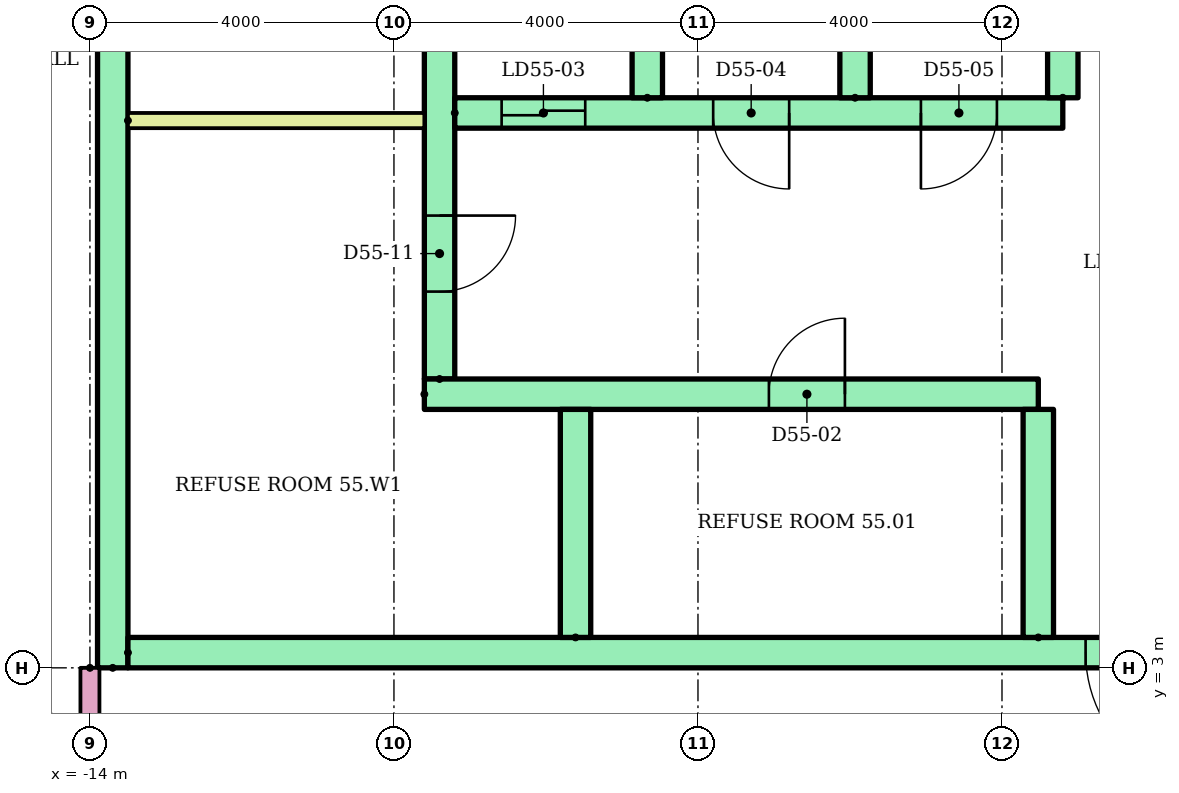
"""IFC4 building model, lengths in metres.
Left out: names, types, materials, properties, quantities, classifications, styles, units other than length and angle.
Written with IfcOpenShell. Run it as: python <this file> out.ifc"""

import sys

from ifc_helpers import new_model, si_unit, direction, frame, frame_2d, origin, place, context, subcontext, project, spatial, rectangle, extrude, element, fill, save


model = new_model("IFC4")
c1 = context("Model", 3, precision=1e-05, world=origin(), true_north=direction((0.0, 1.0)))
c2 = subcontext(c1, "Body", "Model", "MODEL_VIEW")
j1 = project(units=[si_unit("LENGTHUNIT", "METRE"), si_unit("PLANEANGLEUNIT", "RADIAN")], contexts=[c1])
p1 = place(None, origin())
s1 = spatial("IfcSite", under=j1, at=p1, CompositionType="ELEMENT")
p2 = place(p1, origin())
s2 = spatial("IfcBuilding", under=s1, at=p2, CompositionType="ELEMENT")
p3 = place(p2, frame((0.0, 0.0, 214.0)))
s3 = spatial("IfcBuildingStorey", under=s2, at=p3, CompositionType="ELEMENT", Elevation=214.0)
p4 = place(p3, frame((-13.7, 3.0, 0.0), z_axis=(0.0, 0.0, 1.0), x_axis=(0.0, 1.0, 0.0)))
e1 = element("IfcWall", 1, at=p4, inside=s3, PredefinedType="SHEAR", context=c2, shape_type="SweptSolid", body=[
    extrude(rectangle(XDim=17.0, YDim=0.4, at=frame_2d((8.5, 0.0))), origin(), (0.0, 0.0, 1.0), 2.92),
])
p5 = place(p3, frame((-9.4, 6.8, 0.0), z_axis=(0.0, 0.0, 1.0), x_axis=(0.0, 1.0, 0.0)))
e2 = element("IfcWall", 2, at=p5, inside=s3, PredefinedType="SHEAR", context=c2, shape_type="SweptSolid", body=[
    extrude(rectangle(XDim=12.7, YDim=0.4, at=frame_2d((6.35, 0.0))), origin(), (0.0, 0.0, 1.0), 2.92),
])
p6 = place(p5, frame((1.15, 0.0, 0.0)))
e3 = element("IfcOpeningElement", 3, at=p6, cuts=e2, PredefinedType="OPENING", context=c2, shape_type="SweptSolid", body=[
    extrude(rectangle(XDim=1.0, YDim=2.1, at=frame_2d((0.5, 1.05))), frame((0.0, 0.21, 0.0), z_axis=(0.0, -1.0, 0.0), x_axis=(1.0, 0.0, 0.0)), (0.0, 0.0, 1.0), 0.42),
])
p7 = place(p5, frame((7.925, 0.0, 0.0)))
e4 = element("IfcOpeningElement", 4, at=p7, cuts=e2, PredefinedType="OPENING", context=c2, shape_type="SweptSolid", body=[
    extrude(rectangle(XDim=1.0, YDim=2.1, at=frame_2d((0.5, 1.05))), frame((0.0, 0.21, 0.0), z_axis=(0.0, -1.0, 0.0), x_axis=(1.0, 0.0, 0.0)), (0.0, 0.0, 1.0), 0.42),
])
p8 = place(p3, frame((-13.5, 3.2, 0.0)))
e5 = element("IfcWall", 5, at=p8, inside=s3, PredefinedType="SHEAR", context=c2, shape_type="SweptSolid", body=[
    extrude(rectangle(XDim=27.0, YDim=0.4, at=frame_2d((13.5, 0.0))), origin(), (0.0, 0.0, 1.0), 2.92),
])
p9 = place(p8, frame((22.083, 0.0, 0.0)))
e6 = element("IfcOpeningElement", 6, at=p9, cuts=e5, PredefinedType="OPENING", context=c2, shape_type="SweptSolid", body=[
    extrude(rectangle(XDim=1.1, YDim=2.1, at=frame_2d((0.55, 1.05))), frame((0.0, 0.21, 0.0), z_axis=(0.0, -1.0, 0.0), x_axis=(1.0, 0.0, 0.0)), (0.0, 0.0, 1.0), 0.42),
])
p10 = place(p8, frame((25.128, 0.0, 0.0)))
e7 = element("IfcOpeningElement", 7, at=p10, cuts=e5, PredefinedType="OPENING", context=c2, shape_type="SweptSolid", body=[
    extrude(rectangle(XDim=1.1, YDim=2.1, at=frame_2d((0.55, 1.05))), frame((0.0, 0.21, 0.0), z_axis=(0.0, -1.0, 0.0), x_axis=(1.0, 0.0, 0.0)), (0.0, 0.0, 1.0), 0.42),
])
p11 = place(p8, frame((12.6, 0.0, 0.0)))
e8 = element("IfcOpeningElement", 8, at=p11, cuts=e5, PredefinedType="OPENING", context=c2, shape_type="SweptSolid", body=[
    extrude(rectangle(XDim=1.8, YDim=2.1, at=frame_2d((0.9, 1.05))), frame((0.0, 0.21, 0.0), z_axis=(0.0, -1.0, 0.0), x_axis=(1.0, 0.0, 0.0)), (0.0, 0.0, 1.0), 0.42),
])
p12 = place(p3, frame((-9.6, 6.6, 0.0)))
e9 = element("IfcWall", 9, at=p12, inside=s3, PredefinedType="SHEAR", context=c2, shape_type="SweptSolid", body=[
    extrude(rectangle(XDim=8.078, YDim=0.4, at=frame_2d((4.039, 0.0))), origin(), (0.0, 0.0, 1.0), 2.92),
])
p13 = place(p12, frame((4.533, 0.0, 0.0)))
e10 = element("IfcOpeningElement", 10, at=p13, cuts=e9, PredefinedType="OPENING", context=c2, shape_type="SweptSolid", body=[
    extrude(rectangle(XDim=1.0, YDim=2.1, at=frame_2d((0.5, 1.05))), frame((0.0, 0.21, 0.0), z_axis=(0.0, -1.0, 0.0), x_axis=(1.0, 0.0, 0.0)), (0.0, 0.0, 1.0), 0.42),
])
for number, where, z_axis, x_axis in (
    (11, (-7.611, 3.4, 0.0), (0.0, 0.0, 1.0), (0.0, 1.0, 0.0)),
    (12, (-1.522, 3.4, 0.0), (0.0, 0.0, 1.0), (0.0, 1.0, 0.0)),
):
    element("IfcWall", number, at=place(p3, frame(where, z_axis=z_axis, x_axis=x_axis)), inside=s3, PredefinedType="SHEAR", context=c2, shape_type="SweptSolid", body=[
        extrude(rectangle(XDim=3.0, YDim=0.4, at=frame_2d((1.5, 0.0))), origin(), (0.0, 0.0, 1.0), 2.92),
    ])
p14 = place(p3, frame((-9.2, 10.3, 0.0)))
e13 = element("IfcWall", 13, at=p14, inside=s3, PredefinedType="SHEAR", context=c2, shape_type="SweptSolid", body=[
    extrude(rectangle(XDim=8.0, YDim=0.4, at=frame_2d((4.0, 0.0))), origin(), (0.0, 0.0, 1.0), 2.92),
])
p15 = place(p14, frame((0.617, 0.0, 0.0)))
e14 = element("IfcOpeningElement", 14, at=p15, cuts=e13, PredefinedType="OPENING", context=c2, shape_type="SweptSolid", body=[
    extrude(rectangle(XDim=1.1, YDim=2.1, at=frame_2d((0.55, 1.05))), frame((0.0, 0.21, 0.0), z_axis=(0.0, -1.0, 0.0), x_axis=(1.0, 0.0, 0.0)), (0.0, 0.0, 1.0), 0.42),
])
p16 = place(p14, frame((3.4, 0.0, 0.0)))
e15 = element("IfcOpeningElement", 15, at=p16, cuts=e13, PredefinedType="OPENING", context=c2, shape_type="SweptSolid", body=[
    extrude(rectangle(XDim=1.0, YDim=2.1, at=frame_2d((0.5, 1.05))), frame((0.0, 0.21, 0.0), z_axis=(0.0, -1.0, 0.0), x_axis=(1.0, 0.0, 0.0)), (0.0, 0.0, 1.0), 0.42),
])
p17 = place(p14, frame((6.133, 0.0, 0.0)))
e16 = element("IfcOpeningElement", 16, at=p17, cuts=e13, PredefinedType="OPENING", context=c2, shape_type="SweptSolid", body=[
    extrude(rectangle(XDim=1.0, YDim=2.1, at=frame_2d((0.5, 1.05))), frame((0.0, 0.21, 0.0), z_axis=(0.0, -1.0, 0.0), x_axis=(1.0, 0.0, 0.0)), (0.0, 0.0, 1.0), 0.42),
])
for number, where, z_axis, x_axis in (
    (17, (-6.667, 10.5, 0.0), (0.0, 0.0, 1.0), (0.0, 1.0, 0.0)),
    (18, (-3.933, 10.5, 0.0), (0.0, 0.0, 1.0), (0.0, 1.0, 0.0)),
    (19, (-1.2, 10.5, 0.0), (0.0, 0.0, 1.0), (0.0, 1.0, 0.0)),
):
    element("IfcWall", number, at=place(p3, frame(where, z_axis=z_axis, x_axis=x_axis)), inside=s3, PredefinedType="SHEAR", context=c2, shape_type="SweptSolid", body=[
        extrude(rectangle(XDim=3.0, YDim=0.4, at=frame_2d((1.5, 0.0))), origin(), (0.0, 0.0, 1.0), 2.92),
    ])
p18 = place(p3, frame((-13.5, 10.2, 0.0)))
e20 = element("IfcWall", 20, at=p18, inside=s3, PredefinedType="PARTITIONING", context=c2, shape_type="SweptSolid", body=[
    extrude(rectangle(XDim=3.9, YDim=0.2, at=frame_2d((1.95, 0.0))), origin(), (0.0, 0.0, 1.0), 2.92),
])
p19 = place(p3, frame((-14.0, 3.0, 0.0), z_axis=(0.0, 0.0, 1.0), x_axis=(0.0, -1.0, 0.0)))
e21 = element("IfcWall", 21, at=p19, inside=s3, PredefinedType="PARTITIONING", context=c2, shape_type="SweptSolid", body=[
    extrude(rectangle(XDim=1.6, YDim=0.25, at=frame_2d((0.8, 0.0))), origin(), (0.0, 0.0, 1.0), 2.4),
])
p20 = place(p11, frame((1.8, 0.0, 0.0), z_axis=(0.0, 0.0, 1.0), x_axis=(-1.0, 0.0, 0.0)))
e22 = element("IfcDoor", 22, at=p20, inside=s3, OperationType="DOUBLE_DOOR_SINGLE_SWING", PredefinedType="DOOR", context=c2, shape_type="SweptSolid", body=[
    extrude(rectangle(XDim=1.8, YDim=2.1, at=frame_2d((0.9, 1.05))), frame((0.0, 0.025, 0.0), z_axis=(0.0, -1.0, 0.0), x_axis=(1.0, 0.0, 0.0)), (0.0, 0.0, 1.0), 0.05),
])
fill(e8, e22)
p21 = place(p13, origin())
e23 = element("IfcDoor", 23, at=p21, inside=s3, OperationType="SINGLE_SWING_RIGHT", PredefinedType="DOOR", context=c2, shape_type="SweptSolid", body=[
    extrude(rectangle(XDim=1.0, YDim=2.1, at=frame_2d((0.5, 1.05))), frame((0.0, 0.025, 0.0), z_axis=(0.0, -1.0, 0.0), x_axis=(1.0, 0.0, 0.0)), (0.0, 0.0, 1.0), 0.05),
])
fill(e10, e23)
p22 = place(p15, origin())
e24 = element("IfcDoor", 24, at=p22, inside=s3, OperationType="SLIDING_TO_LEFT", PredefinedType="DOOR", context=c2, shape_type="SweptSolid", body=[
    extrude(rectangle(XDim=1.1, YDim=2.1, at=frame_2d((0.55, 1.05))), frame((0.0, 0.025, 0.0), z_axis=(0.0, -1.0, 0.0), x_axis=(1.0, 0.0, 0.0)), (0.0, 0.0, 1.0), 0.05),
])
fill(e14, e24)
p23 = place(p16, frame((1.0, 0.0, 0.0), z_axis=(0.0, 0.0, 1.0), x_axis=(-1.0, 0.0, 0.0)))
e25 = element("IfcDoor", 25, at=p23, inside=s3, OperationType="SINGLE_SWING_RIGHT", PredefinedType="DOOR", context=c2, shape_type="SweptSolid", body=[
    extrude(rectangle(XDim=1.0, YDim=2.1, at=frame_2d((0.5, 1.05))), frame((0.0, 0.025, 0.0), z_axis=(0.0, -1.0, 0.0), x_axis=(1.0, 0.0, 0.0)), (0.0, 0.0, 1.0), 0.05),
])
fill(e15, e25)
p24 = place(p17, frame((1.0, 0.0, 0.0), z_axis=(0.0, 0.0, 1.0), x_axis=(-1.0, 0.0, 0.0)))
e26 = element("IfcDoor", 26, at=p24, inside=s3, OperationType="SINGLE_SWING_LEFT", PredefinedType="DOOR", context=c2, shape_type="SweptSolid", body=[
    extrude(rectangle(XDim=1.0, YDim=2.1, at=frame_2d((0.5, 1.05))), frame((0.0, 0.025, 0.0), z_axis=(0.0, -1.0, 0.0), x_axis=(1.0, 0.0, 0.0)), (0.0, 0.0, 1.0), 0.05),
])
fill(e16, e26)
p25 = place(p6, frame((1.0, 0.0, 0.0), z_axis=(0.0, 0.0, 1.0), x_axis=(-1.0, 0.0, 0.0)))
e27 = element("IfcDoor", 27, at=p25, inside=s3, OperationType="SINGLE_SWING_RIGHT", PredefinedType="DOOR", context=c2, shape_type="SweptSolid", body=[
    extrude(rectangle(XDim=1.0, YDim=2.1, at=frame_2d((0.5, 1.05))), frame((0.0, 0.025, 0.0), z_axis=(0.0, -1.0, 0.0), x_axis=(1.0, 0.0, 0.0)), (0.0, 0.0, 1.0), 0.05),
])
fill(e3, e27)
save(model, sys.argv[1])
